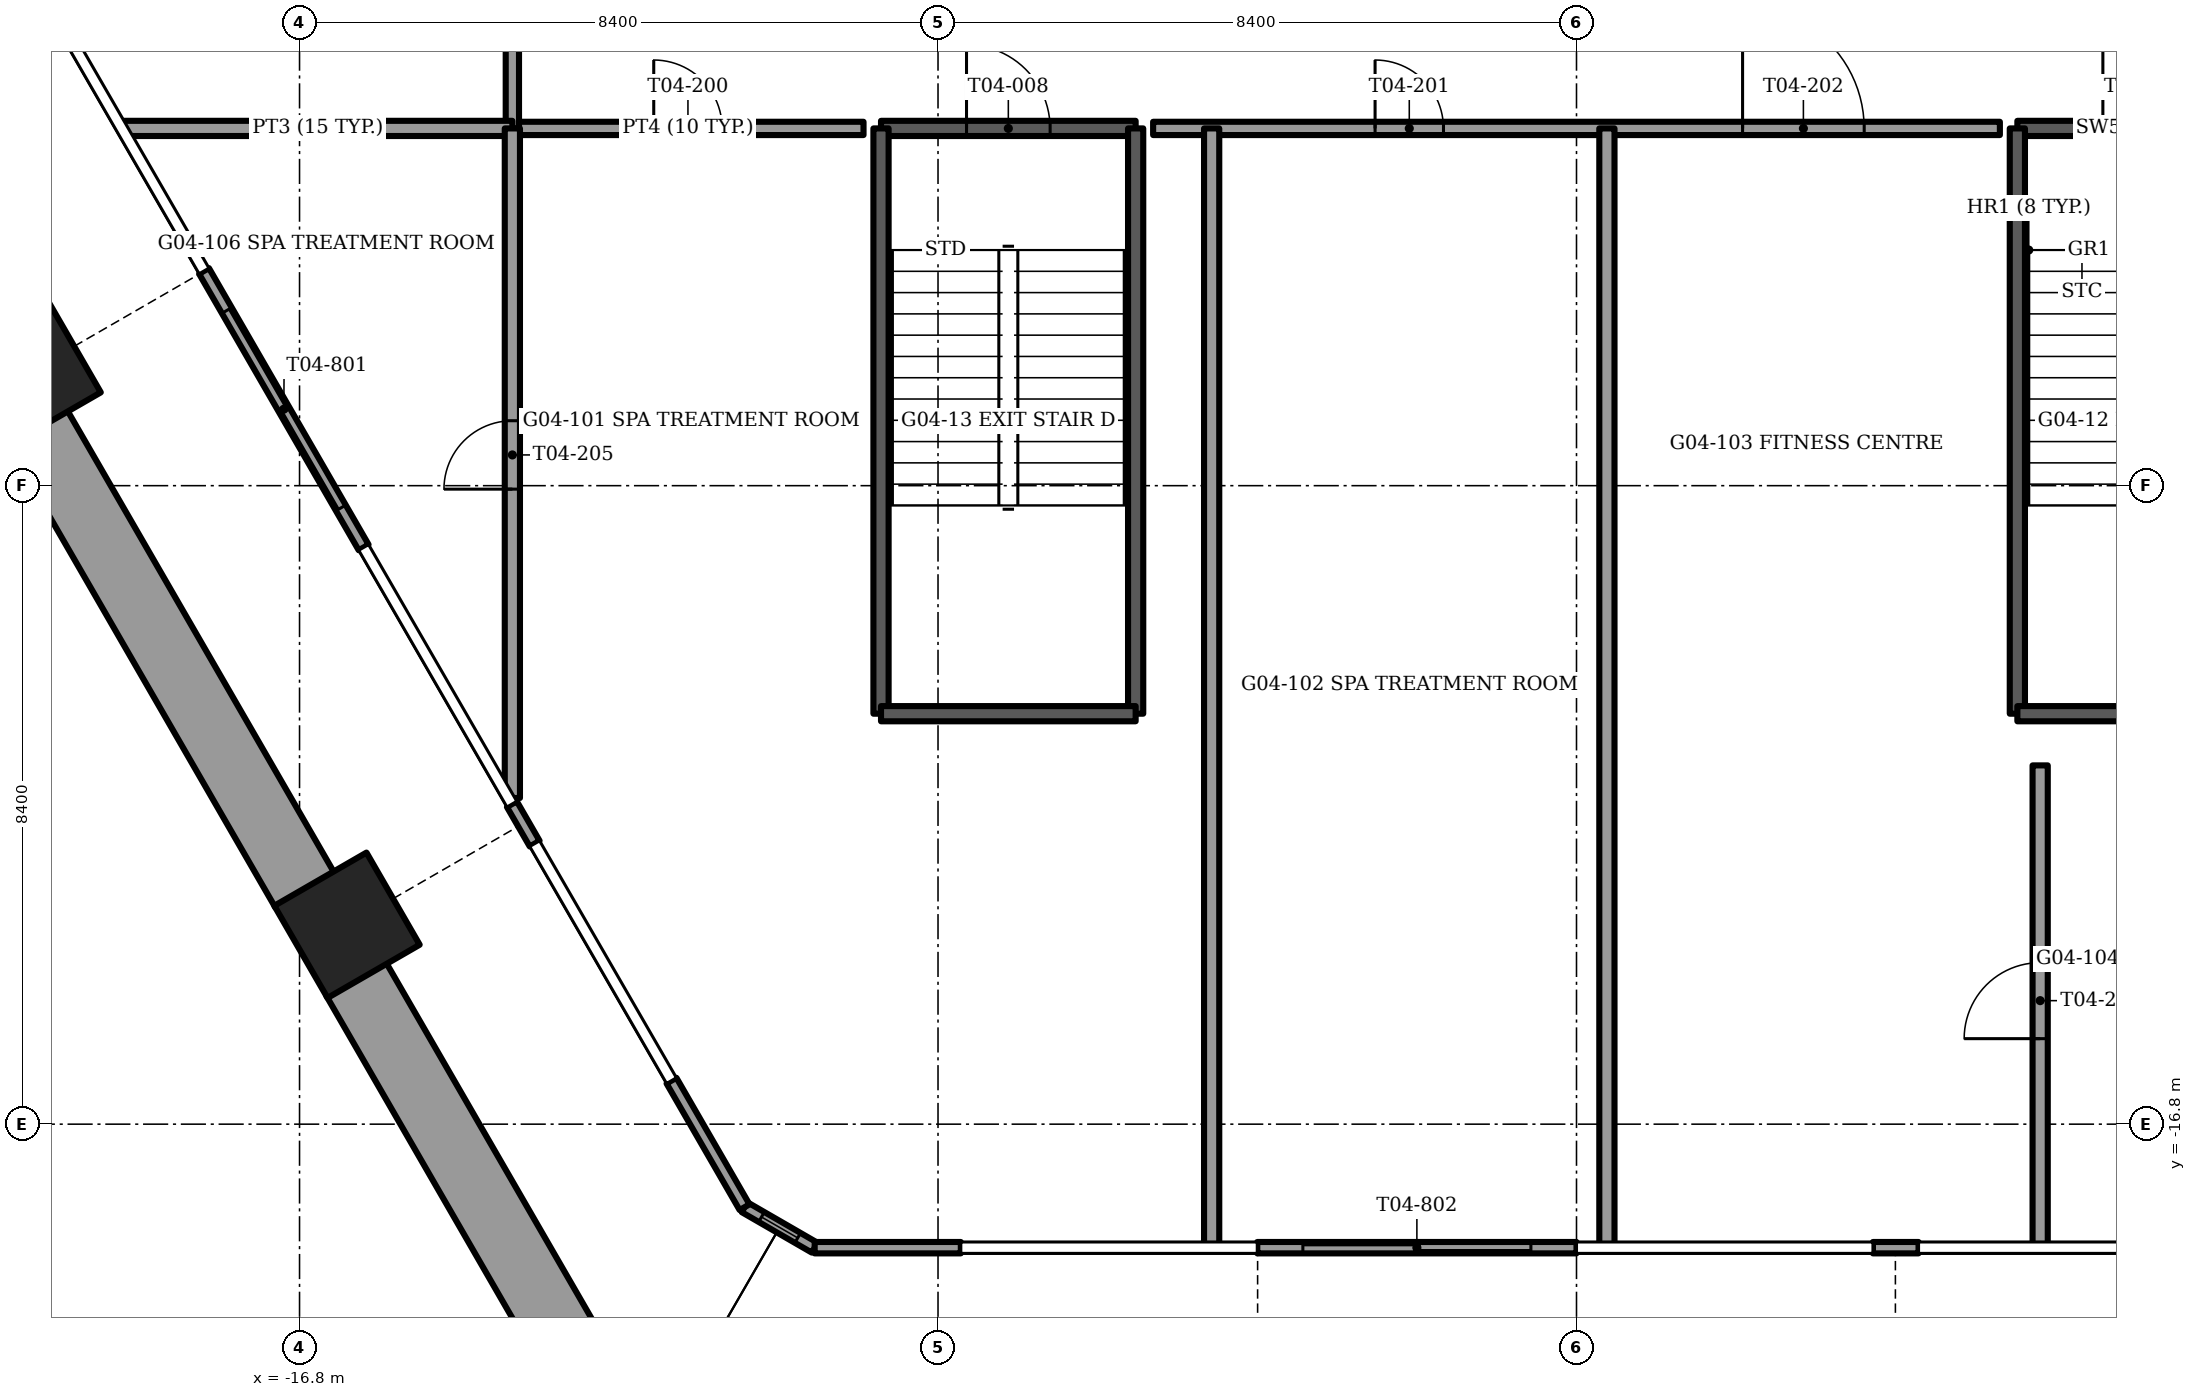
"""IFC4 building model, lengths in metres.
Left out: names, types, materials, properties, quantities, classifications, styles, units other than length and angle.
Written with IfcOpenShell. Run it as: python <this file> out.ifc"""

import sys

from ifc_helpers import new_model, si_unit, direction, frame, frame_2d, origin, origin_2d, place, context, subcontext, project, spatial, rectangle, extrude, element, fill, save


model = new_model("IFC4")
c1 = context("Model", 3, precision=1e-05, world=origin(), true_north=direction((0.0, 1.0)))
c2 = subcontext(c1, "Body", "Model", "MODEL_VIEW")
j1 = project(units=[si_unit("LENGTHUNIT", "METRE"), si_unit("PLANEANGLEUNIT", "RADIAN")], contexts=[c1])
p1 = place(None, origin())
s1 = spatial("IfcSite", under=j1, at=p1, CompositionType="ELEMENT")
p2 = place(p1, origin())
s2 = spatial("IfcBuilding", under=s1, at=p2, CompositionType="ELEMENT")
p3 = place(p2, frame((0.0, 0.0, 19.0)))
s3 = spatial("IfcBuildingStorey", under=s2, at=p3, CompositionType="ELEMENT", Elevation=19.0)
for number, where, z_axis, x_axis in (
    (1, (-20.371, -6.917, -1.2), (0.0, 0.0, 1.0), (-0.5, 0.866, 0.0)),
    (2, (-16.175, -14.183, -1.2), (0.0, 0.0, 1.0), (-0.5, 0.866, 0.0)),
):
    element("IfcColumn", number, at=place(p3, frame(where, z_axis=z_axis, x_axis=x_axis)), inside=s3, PredefinedType="COLUMN", context=c2, shape_type="SweptSolid", body=[
        extrude(rectangle(XDim=1.4, YDim=1.4, at=origin_2d()), origin(), (0.0, 0.0, 1.0), 4.5),
    ])
p4 = place(p3, frame((-20.252, -7.622, 0.0), z_axis=(0.0, 0.0, 1.0), x_axis=(0.499997206141, -0.866027016814, 0.0)))
e3 = element("IfcWall", 3, at=p4, inside=s3, PredefinedType="PARAPET", context=c2, shape_type="SweptSolid", body=[
    extrude(rectangle(XDim=7.051, YDim=0.9, at=frame_2d((3.525, 0.0))), origin(), (0.0, 0.0, 1.0), 1.1),
])
p5 = place(p3, frame((-16.057, -14.889, 0.0), z_axis=(0.0, 0.0, 1.0), x_axis=(0.500005133765, -0.866022439784, 0.0)))
e4 = element("IfcWall", 4, at=p5, inside=s3, PredefinedType="PARAPET", context=c2, shape_type="SweptSolid", body=[
    extrude(rectangle(XDim=6.704, YDim=0.9, at=frame_2d((3.352, 0.0))), origin(), (0.0, 0.0, 1.0), 1.1),
])
p6 = place(p3, frame((-18.056, -5.575, 0.0), z_axis=(0.0, 0.0, 1.0), x_axis=(0.49998411664, -0.866034573852, 0.0)))
e5 = element("IfcWall", 5, at=p6, inside=s3, PredefinedType="SOLIDWALL", context=c2, shape_type="SweptSolid", body=[
    extrude(rectangle(XDim=4.2, YDim=0.15, at=frame_2d((2.1, 0.0))), origin(), (0.0, 0.0, 1.0), 4.2),
])
p7 = place(p6, frame((0.6, 0.0, 0.0)))
e6 = element("IfcOpeningElement", 6, at=p7, cuts=e5, PredefinedType="OPENING", context=c2, shape_type="SweptSolid", body=[
    extrude(rectangle(XDim=3.0, YDim=2.4, at=frame_2d((1.5, 1.2))), frame((0.0, 0.075, 0.0), z_axis=(0.0, -1.0, 0.0), x_axis=(1.0, 0.0, 0.0)), (0.0, 0.0, 1.0), 0.15),
])
p8 = place(p3, frame((-11.906, -16.227, 0.0), z_axis=(0.0, 0.0, 1.0), x_axis=(0.499989888488, -0.86603124159, 0.0)))
e7 = element("IfcWall", 7, at=p8, inside=s3, PredefinedType="SOLIDWALL", context=c2, shape_type="SweptSolid", body=[
    extrude(rectangle(XDim=1.923, YDim=0.15, at=frame_2d((0.961, 0.0))), origin(), (0.0, 0.0, 1.0), 4.2),
])
p9 = place(p3, frame((-14.007, -12.59, 0.0), z_axis=(0.0, 0.0, 1.0), x_axis=(0.50012165622, -0.865955154139, 0.0)))
e8 = element("IfcWall", 8, at=p9, inside=s3, PredefinedType="SOLIDWALL", context=c2, shape_type="SweptSolid", body=[
    extrude(rectangle(XDim=0.6, YDim=0.15, at=frame_2d((0.3, 0.0))), origin(), (0.0, 0.0, 1.0), 4.2),
])
p10 = place(p3, frame((-4.2, -18.425, 0.0), z_axis=(0.0, 0.0, 1.0), x_axis=(1.0, 0.0, 0.0)))
e9 = element("IfcWall", 9, at=p10, inside=s3, PredefinedType="SOLIDWALL", context=c2, shape_type="SweptSolid", body=[
    extrude(rectangle(XDim=4.2, YDim=0.15, at=frame_2d((2.1, 0.0))), origin(), (0.0, 0.0, 1.0), 4.2),
])
p11 = place(p10, frame((0.6, 0.0, 0.0)))
e10 = element("IfcOpeningElement", 10, at=p11, cuts=e9, PredefinedType="OPENING", context=c2, shape_type="SweptSolid", body=[
    extrude(rectangle(XDim=3.0, YDim=2.4, at=frame_2d((1.5, 1.2))), frame((0.0, 0.075, 0.0), z_axis=(0.0, -1.0, 0.0), x_axis=(1.0, 0.0, 0.0)), (0.0, 0.0, 1.0), 0.15),
])
p12 = place(p3, frame((-10.023, -18.425, 0.0), z_axis=(0.0, 0.0, 1.0), x_axis=(1.0, 0.0, 0.0)))
e11 = element("IfcWall", 11, at=p12, inside=s3, PredefinedType="SOLIDWALL", context=c2, shape_type="SweptSolid", body=[
    extrude(rectangle(XDim=1.923, YDim=0.15, at=frame_2d((0.961, 0.0))), origin(), (0.0, 0.0, 1.0), 4.2),
])
p13 = place(p3, frame((3.9, -18.425, 0.0), z_axis=(0.0, 0.0, 1.0), x_axis=(1.0, 0.0, 0.0)))
e12 = element("IfcWall", 12, at=p13, inside=s3, PredefinedType="SOLIDWALL", context=c2, shape_type="SweptSolid", body=[
    extrude(rectangle(XDim=0.6, YDim=0.15, at=frame_2d((0.3, 0.0))), origin(), (0.0, 0.0, 1.0), 4.2),
])
p14 = place(p3, frame((-10.945, -17.893, 0.0), z_axis=(0.0, 0.0, 1.0), x_axis=(0.866048165231, -0.499960573946, 0.0)))
e13 = element("IfcWall", 13, at=p14, inside=s3, PredefinedType="SOLIDWALL", context=c2, shape_type="SweptSolid", body=[
    extrude(rectangle(XDim=1.065, YDim=0.15, at=frame_2d((0.532, 0.0))), origin(), (0.0, 0.0, 1.0), 4.2),
])
p15 = place(p14, frame((0.258, 0.0, 0.15)))
e14 = element("IfcOpeningElement", 14, at=p15, cuts=e13, PredefinedType="OPENING", context=c2, shape_type="SweptSolid", body=[
    extrude(rectangle(XDim=0.55, YDim=3.6, at=frame_2d((0.275, 1.8))), frame((0.0, 0.075, 0.0), z_axis=(0.0, -1.0, 0.0), x_axis=(1.0, 0.0, 0.0)), (0.0, 0.0, 1.0), 0.15),
])
p16 = place(p3, frame((5.8, -3.7, -0.3), z_axis=(0.0, 0.0, 1.0), x_axis=(1.0, 0.0, 0.0)))
e15 = element("IfcWall", 15, at=p16, inside=s3, PredefinedType="SOLIDWALL", context=c2, shape_type="SweptSolid", body=[
    extrude(rectangle(XDim=3.35, YDim=0.2, at=frame_2d((1.675, 0.0))), origin(), (0.0, 0.0, 1.0), 4.5),
])
p17 = place(p16, frame((1.125, 0.0, 0.0)))
e16 = element("IfcOpeningElement", 16, at=p17, cuts=e15, PredefinedType="OPENING", context=c2, shape_type="SweptSolid", body=[
    extrude(rectangle(XDim=1.1, YDim=2.1, at=frame_2d((0.55, 1.05))), frame((0.0, 0.1, 0.0), z_axis=(0.0, -1.0, 0.0), x_axis=(1.0, 0.0, 0.0)), (0.0, 0.0, 1.0), 0.2),
])
p18 = place(p3, frame((5.8, -3.7, -0.3), z_axis=(0.0, 0.0, 1.0), x_axis=(0.0, -1.0, 0.0)))
e17 = element("IfcWall", 17, at=p18, inside=s3, PredefinedType="SOLIDWALL", context=c2, shape_type="SweptSolid", body=[
    extrude(rectangle(XDim=7.7, YDim=0.2, at=frame_2d((3.85, 0.0))), origin(), (0.0, 0.0, 1.0), 4.5),
])
p19 = place(p3, frame((5.8, -11.4, -0.3), z_axis=(0.0, 0.0, 1.0), x_axis=(1.0, 0.0, 0.0)))
e18 = element("IfcWall", 18, at=p19, inside=s3, PredefinedType="SOLIDWALL", context=c2, shape_type="SweptSolid", body=[
    extrude(rectangle(XDim=3.35, YDim=0.2, at=frame_2d((1.675, 0.0))), origin(), (0.0, 0.0, 1.0), 4.5),
])
p20 = place(p3, frame((-9.15, -3.7, -0.3), z_axis=(0.0, 0.0, 1.0), x_axis=(1.0, 0.0, 0.0)))
e19 = element("IfcWall", 19, at=p20, inside=s3, PredefinedType="SOLIDWALL", context=c2, shape_type="SweptSolid", body=[
    extrude(rectangle(XDim=3.35, YDim=0.2, at=frame_2d((1.675, 0.0))), origin(), (0.0, 0.0, 1.0), 4.5),
])
p21 = place(p20, frame((1.125, 0.0, 0.0)))
e20 = element("IfcOpeningElement", 20, at=p21, cuts=e19, PredefinedType="OPENING", context=c2, shape_type="SweptSolid", body=[
    extrude(rectangle(XDim=1.1, YDim=2.1, at=frame_2d((0.55, 1.05))), frame((0.0, 0.1, 0.0), z_axis=(0.0, -1.0, 0.0), x_axis=(1.0, 0.0, 0.0)), (0.0, 0.0, 1.0), 0.2),
])
for number, where, z_axis, x_axis in (
    (21, (-9.15, -3.7, -0.3), (0.0, 0.0, 1.0), (0.0, -1.0, 0.0)),
    (22, (-5.8, -3.7, -0.3), (0.0, 0.0, 1.0), (0.0, -1.0, 0.0)),
):
    element("IfcWall", number, at=place(p3, frame(where, z_axis=z_axis, x_axis=x_axis)), inside=s3, PredefinedType="SOLIDWALL", context=c2, shape_type="SweptSolid", body=[
        extrude(rectangle(XDim=7.7, YDim=0.2, at=frame_2d((3.85, 0.0))), origin(), (0.0, 0.0, 1.0), 4.5),
    ])
p22 = place(p3, frame((-9.15, -11.4, -0.3), z_axis=(0.0, 0.0, 1.0), x_axis=(1.0, 0.0, 0.0)))
e23 = element("IfcWall", 23, at=p22, inside=s3, PredefinedType="SOLIDWALL", context=c2, shape_type="SweptSolid", body=[
    extrude(rectangle(XDim=3.35, YDim=0.2, at=frame_2d((1.675, 0.0))), origin(), (0.0, 0.0, 1.0), 4.5),
])
p23 = place(p3, frame((-14.0, -3.7, 0.0), z_axis=(0.0, 0.0, 1.0), x_axis=(1.0, 0.0, 0.0)))
e24 = element("IfcWall", 24, at=p23, inside=s3, PredefinedType="PARTITIONING", context=c2, shape_type="SweptSolid", body=[
    extrude(rectangle(XDim=4.62, YDim=0.175, at=frame_2d((2.31, 0.0))), origin(), (0.0, 0.0, 1.0), 4.2),
])
p24 = place(p23, frame((1.86, 0.0, 0.0)))
e25 = element("IfcOpeningElement", 25, at=p24, cuts=e24, PredefinedType="OPENING", context=c2, shape_type="SweptSolid", body=[
    extrude(rectangle(XDim=0.9, YDim=2.1, at=frame_2d((0.45, 1.05))), frame((0.0, 0.087, 0.0), z_axis=(0.0, -1.0, 0.0), x_axis=(1.0, 0.0, 0.0)), (0.0, 0.0, 1.0), 0.175),
])
p25 = place(p3, frame((-5.57, -3.7, 0.0), z_axis=(0.0, 0.0, 1.0), x_axis=(1.0, 0.0, 0.0)))
e26 = element("IfcWall", 26, at=p25, inside=s3, PredefinedType="PARTITIONING", context=c2, shape_type="SweptSolid", body=[
    extrude(rectangle(XDim=11.14, YDim=0.175, at=frame_2d((5.57, 0.0))), origin(), (0.0, 0.0, 1.0), 4.2),
])
p26 = place(p25, frame((2.92, 0.0, 0.0)))
e27 = element("IfcOpeningElement", 27, at=p26, cuts=e26, PredefinedType="OPENING", context=c2, shape_type="SweptSolid", body=[
    extrude(rectangle(XDim=0.9, YDim=2.1, at=frame_2d((0.45, 1.05))), frame((0.0, 0.087, 0.0), z_axis=(0.0, -1.0, 0.0), x_axis=(1.0, 0.0, 0.0)), (0.0, 0.0, 1.0), 0.175),
])
p27 = place(p25, frame((7.755, 0.0, 0.0)))
e28 = element("IfcOpeningElement", 28, at=p27, cuts=e26, PredefinedType="OPENING", context=c2, shape_type="SweptSolid", body=[
    extrude(rectangle(XDim=1.6, YDim=2.1, at=frame_2d((0.8, 1.05))), frame((0.0, 0.087, 0.0), z_axis=(0.0, -1.0, 0.0), x_axis=(1.0, 0.0, 0.0)), (0.0, 0.0, 1.0), 0.175),
])
p28 = place(p3, frame((-14.0, -3.7, 0.0), z_axis=(0.0, 0.0, 1.0), x_axis=(0.0, 1.0, 0.0)))
e29 = element("IfcWall", 29, at=p28, inside=s3, PredefinedType="PARTITIONING", context=c2, shape_type="SweptSolid", body=[
    extrude(rectangle(XDim=15.4, YDim=0.175, at=frame_2d((7.7, 0.0))), origin(), (0.0, 0.0, 1.0), 4.2),
])
p29 = place(p28, frame((4.5, 0.0, 0.0)))
e30 = element("IfcOpeningElement", 30, at=p29, cuts=e29, PredefinedType="OPENING", context=c2, shape_type="SweptSolid", body=[
    extrude(rectangle(XDim=1.6, YDim=2.1, at=frame_2d((0.8, 1.05))), frame((0.0, 0.087, 0.0), z_axis=(0.0, -1.0, 0.0), x_axis=(1.0, 0.0, 0.0)), (0.0, 0.0, 1.0), 0.175),
])
p30 = place(p28, frame((12.5, 0.0, 0.0)))
e31 = element("IfcOpeningElement", 31, at=p30, cuts=e29, PredefinedType="OPENING", context=c2, shape_type="SweptSolid", body=[
    extrude(rectangle(XDim=1.0, YDim=2.1, at=frame_2d((0.5, 1.05))), frame((0.0, 0.087, 0.0), z_axis=(0.0, -1.0, 0.0), x_axis=(1.0, 0.0, 0.0)), (0.0, 0.0, 1.0), 0.175),
])
p31 = place(p3, frame((-19.118, -3.7, 0.0), z_axis=(0.0, 0.0, 1.0), x_axis=(1.0, 0.0, 0.0)))
e32 = element("IfcWall", 32, at=p31, inside=s3, PredefinedType="PARTITIONING", context=c2, shape_type="SweptSolid", body=[
    extrude(rectangle(XDim=5.118, YDim=0.2, at=frame_2d((2.559, 0.0))), origin(), (0.0, 0.0, 1.0), 4.2),
])
p32 = place(p3, frame((-14.0, -12.509, 0.0), z_axis=(0.0, 0.0, 1.0), x_axis=(0.0, 1.0, 0.0)))
e33 = element("IfcWall", 33, at=p32, inside=s3, PredefinedType="PARTITIONING", context=c2, shape_type="SweptSolid", body=[
    extrude(rectangle(XDim=8.809, YDim=0.2, at=frame_2d((4.405, 0.0))), origin(), (0.0, 0.0, 1.0), 4.2),
])
p33 = place(p32, frame((4.063, 0.0, 0.0)))
e34 = element("IfcOpeningElement", 34, at=p33, cuts=e33, PredefinedType="OPENING", context=c2, shape_type="SweptSolid", body=[
    extrude(rectangle(XDim=0.9, YDim=2.1, at=frame_2d((0.45, 1.05))), frame((0.0, 0.1, 0.0), z_axis=(0.0, -1.0, 0.0), x_axis=(1.0, 0.0, 0.0)), (0.0, 0.0, 1.0), 0.2),
])
for number, where, z_axis, x_axis in (
    (35, (-4.8, -18.406, 0.0), (0.0, 0.0, 1.0), (0.0, 1.0, 0.0)),
    (36, (0.4, -18.406, 0.0), (0.0, 0.0, 1.0), (0.0, 1.0, 0.0)),
):
    element("IfcWall", number, at=place(p3, frame(where, z_axis=z_axis, x_axis=x_axis)), inside=s3, PredefinedType="PARTITIONING", context=c2, shape_type="SweptSolid", body=[
        extrude(rectangle(XDim=14.706, YDim=0.2, at=frame_2d((7.353, 0.0))), origin(), (0.0, 0.0, 1.0), 4.2),
    ])
p34 = place(p3, frame((6.1, -18.406, 0.0), z_axis=(0.0, 0.0, 1.0), x_axis=(0.0, 1.0, 0.0)))
e37 = element("IfcWall", 37, at=p34, inside=s3, PredefinedType="PARTITIONING", context=c2, shape_type="SweptSolid", body=[
    extrude(rectangle(XDim=6.326, YDim=0.2, at=frame_2d((3.163, 0.0))), origin(), (0.0, 0.0, 1.0), 4.2),
])
p35 = place(p34, frame((2.731, 0.0, 0.0)))
e38 = element("IfcOpeningElement", 38, at=p35, cuts=e37, PredefinedType="OPENING", context=c2, shape_type="SweptSolid", body=[
    extrude(rectangle(XDim=1.0, YDim=2.1, at=frame_2d((0.5, 1.05))), frame((0.0, 0.1, 0.0), z_axis=(0.0, -1.0, 0.0), x_axis=(1.0, 0.0, 0.0)), (0.0, 0.0, 1.0), 0.2),
])
p36 = place(p7, origin())
e39 = element("IfcDoor", 39, at=p36, inside=s3, OperationType="SLIDING_TO_RIGHT", PredefinedType="DOOR", context=c2, shape_type="SweptSolid", body=[
    extrude(rectangle(XDim=3.0, YDim=2.4, at=frame_2d((1.5, 1.2))), frame((0.0, 0.025, 0.0), z_axis=(0.0, -1.0, 0.0), x_axis=(1.0, 0.0, 0.0)), (0.0, 0.0, 1.0), 0.05),
])
fill(e6, e39)
p37 = place(p11, origin())
e40 = element("IfcDoor", 40, at=p37, inside=s3, OperationType="SLIDING_TO_RIGHT", PredefinedType="DOOR", context=c2, shape_type="SweptSolid", body=[
    extrude(rectangle(XDim=3.0, YDim=2.4, at=frame_2d((1.5, 1.2))), frame((0.0, 0.025, 0.0), z_axis=(0.0, -1.0, 0.0), x_axis=(1.0, 0.0, 0.0)), (0.0, 0.0, 1.0), 0.05),
])
fill(e10, e40)
p38 = place(p15, origin())
e41 = element("IfcWindow", 41, at=p38, inside=s3, PartitioningType="SINGLE_PANEL", PredefinedType="WINDOW", context=c2, shape_type="SweptSolid", body=[
    extrude(rectangle(XDim=0.55, YDim=3.6, at=frame_2d((0.275, 1.8))), frame((0.0, 0.03, 0.0), z_axis=(0.0, -1.0, 0.0), x_axis=(1.0, 0.0, 0.0)), (0.0, 0.0, 1.0), 0.06),
])
fill(e14, e41)
p39 = place(p17, origin())
e42 = element("IfcDoor", 42, at=p39, inside=s3, OperationType="SINGLE_SWING_LEFT", PredefinedType="DOOR", context=c2, shape_type="SweptSolid", body=[
    extrude(rectangle(XDim=1.1, YDim=2.1, at=frame_2d((0.55, 1.05))), frame((0.0, 0.025, 0.0), z_axis=(0.0, -1.0, 0.0), x_axis=(1.0, 0.0, 0.0)), (0.0, 0.0, 1.0), 0.05),
])
fill(e16, e42)
p40 = place(p21, origin())
e43 = element("IfcDoor", 43, at=p40, inside=s3, OperationType="SINGLE_SWING_LEFT", PredefinedType="DOOR", context=c2, shape_type="SweptSolid", body=[
    extrude(rectangle(XDim=1.1, YDim=2.1, at=frame_2d((0.55, 1.05))), frame((0.0, 0.025, 0.0), z_axis=(0.0, -1.0, 0.0), x_axis=(1.0, 0.0, 0.0)), (0.0, 0.0, 1.0), 0.05),
])
fill(e20, e43)
p41 = place(p24, origin())
e44 = element("IfcDoor", 44, at=p41, inside=s3, OperationType="SINGLE_SWING_RIGHT", PredefinedType="DOOR", context=c2, shape_type="SweptSolid", body=[
    extrude(rectangle(XDim=0.9, YDim=2.1, at=frame_2d((0.45, 1.05))), frame((0.0, 0.025, 0.0), z_axis=(0.0, -1.0, 0.0), x_axis=(1.0, 0.0, 0.0)), (0.0, 0.0, 1.0), 0.05),
])
fill(e25, e44)
p42 = place(p26, origin())
e45 = element("IfcDoor", 45, at=p42, inside=s3, OperationType="SINGLE_SWING_LEFT", PredefinedType="DOOR", context=c2, shape_type="SweptSolid", body=[
    extrude(rectangle(XDim=0.9, YDim=2.1, at=frame_2d((0.45, 1.05))), frame((0.0, 0.025, 0.0), z_axis=(0.0, -1.0, 0.0), x_axis=(1.0, 0.0, 0.0)), (0.0, 0.0, 1.0), 0.05),
])
fill(e27, e45)
p43 = place(p27, origin())
e46 = element("IfcDoor", 46, at=p43, inside=s3, OperationType="DOUBLE_DOOR_SINGLE_SWING", PredefinedType="DOOR", context=c2, shape_type="SweptSolid", body=[
    extrude(rectangle(XDim=1.6, YDim=2.1, at=frame_2d((0.8, 1.05))), frame((0.0, 0.025, 0.0), z_axis=(0.0, -1.0, 0.0), x_axis=(1.0, 0.0, 0.0)), (0.0, 0.0, 1.0), 0.05),
])
fill(e28, e46)
p44 = place(p35, origin())
e47 = element("IfcDoor", 47, at=p44, inside=s3, OperationType="SINGLE_SWING_LEFT", PredefinedType="DOOR", context=c2, shape_type="SweptSolid", body=[
    extrude(rectangle(XDim=1.0, YDim=2.1, at=frame_2d((0.5, 1.05))), frame((0.0, 0.025, 0.0), z_axis=(0.0, -1.0, 0.0), x_axis=(1.0, 0.0, 0.0)), (0.0, 0.0, 1.0), 0.05),
])
fill(e38, e47)
p45 = place(p33, origin())
e48 = element("IfcDoor", 48, at=p45, inside=s3, OperationType="SINGLE_SWING_LEFT", PredefinedType="DOOR", context=c2, shape_type="SweptSolid", body=[
    extrude(rectangle(XDim=0.9, YDim=2.1, at=frame_2d((0.45, 1.05))), frame((0.0, 0.025, 0.0), z_axis=(0.0, -1.0, 0.0), x_axis=(1.0, 0.0, 0.0)), (0.0, 0.0, 1.0), 0.05),
])
fill(e34, e48)
save(model, sys.argv[1])
